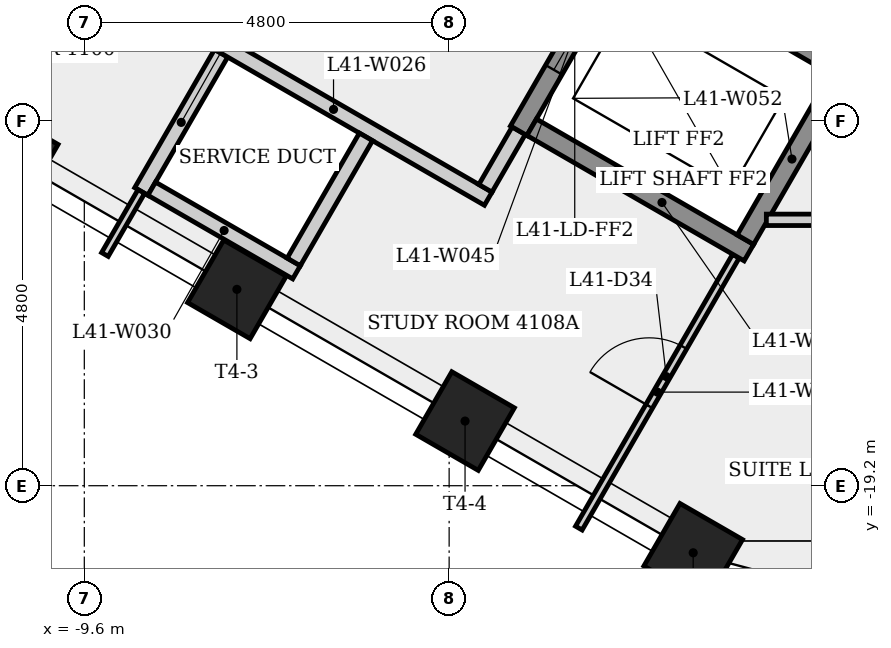
"""IFC4 building model, lengths in metres.
Left out: names, types, materials, properties, quantities, classifications, styles, units other than length and angle.
Written with IfcOpenShell. Run it as: python <this file> out.ifc"""

import sys

from ifc_helpers import new_model, si_unit, direction, frame, frame_2d, origin, origin_2d, place, context, subcontext, project, spatial, rectangle, extrude, element, fill, save


model = new_model("IFC4")
c1 = context("Model", 3, precision=1e-05, world=origin(), true_north=direction((0.0, 1.0)))
c2 = subcontext(c1, "Body", "Model", "MODEL_VIEW")
j1 = project(units=[si_unit("LENGTHUNIT", "METRE"), si_unit("PLANEANGLEUNIT", "RADIAN")], contexts=[c1])
p1 = place(None, origin())
s1 = spatial("IfcSite", under=j1, at=p1, CompositionType="ELEMENT")
p2 = place(p1, origin())
s2 = spatial("IfcBuilding", under=s1, at=p2, CompositionType="ELEMENT")
p3 = place(p2, frame((0.0, 0.0, 156.1)))
s3 = spatial("IfcBuildingStorey", under=s2, at=p3, CompositionType="ELEMENT", Elevation=156.1)
for number, where, z_axis, x_axis in (
    (1, (-10.594, -14.884, 0.0), (0.0, 0.0, 1.0), (-0.5, -0.866, 0.0)),
    (2, (-7.593, -16.616, 0.0), (0.0, 0.0, 1.0), (-0.5, -0.866, 0.0)),
    (3, (-4.591, -18.35, 0.0), (0.0, 0.0, 1.0), (-0.5, -0.866, 0.0)),
    (4, (-1.589, -20.083, 0.0), (0.0, 0.0, 1.0), (-0.5, -0.866, 0.0)),
):
    element("IfcColumn", number, at=place(p3, frame(where, z_axis=z_axis, x_axis=x_axis)), inside=s3, PredefinedType="COLUMN", context=c2, shape_type="SweptSolid", body=[
        extrude(rectangle(XDim=0.95, YDim=0.95, at=origin_2d()), origin(), (0.0, 0.0, 1.0), 3.4),
    ])
p4 = place(p3, frame((-8.85, -15.329, 0.0), z_axis=(0.0, 0.0, 1.0), x_axis=(0.500027713859, 0.866009402589, 0.0)))
e5 = element("IfcWall", 5, at=p4, inside=s3, PredefinedType="PLUMBINGWALL", context=c2, shape_type="SweptSolid", body=[
    extrude(rectangle(XDim=2.1, YDim=0.2, at=frame_2d((1.05, 0.0))), origin(), (0.0, 0.0, 1.0), 3.05),
])
p5 = place(p3, frame((-9.329, -16.158, 0.0), z_axis=(0.0, 0.0, 1.0), x_axis=(0.499950501706, 0.866053979752, 0.0)))
e6 = element("IfcWall", 6, at=p5, inside=s3, PredefinedType="PARTITIONING", context=c2, shape_type="SweptSolid", body=[
    extrude(rectangle(XDim=0.958, YDim=0.1, at=frame_2d((0.479, 0.0))), origin(), (0.0, 0.0, 1.0), 3.05),
])
p6 = place(p3, frame((-8.356, -13.073, 0.0), z_axis=(0.0, 0.0, 1.0), x_axis=(0.866038532462, -0.499977259774, 0.0)))
e7 = element("IfcWall", 7, at=p6, inside=s3, PredefinedType="PARTITIONING", context=c2, shape_type="SweptSolid", body=[
    extrude(rectangle(XDim=4.7, YDim=0.2, at=frame_2d((2.35, 0.0))), origin(), (0.0, 0.0, 1.0), 3.05),
])
p7 = place(p3, frame((-6.808, -16.392, 0.0), z_axis=(0.0, 0.0, 1.0), x_axis=(-0.866008176907, 0.50002983664, 0.0)))
e8 = element("IfcWall", 8, at=p7, inside=s3, PredefinedType="PLUMBINGWALL", context=c2, shape_type="SweptSolid", body=[
    extrude(rectangle(XDim=2.2, YDim=0.2, at=frame_2d((1.1, 0.0))), origin(), (0.0, 0.0, 1.0), 3.05),
])
p8 = place(p3, frame((-5.895, -14.61, 0.0), z_axis=(0.0, 0.0, 1.0), x_axis=(-0.500022797313, -0.86601224135, 0.0)))
e9 = element("IfcWall", 9, at=p8, inside=s3, PredefinedType="PLUMBINGWALL", context=c2, shape_type="SweptSolid", body=[
    extrude(rectangle(XDim=1.9, YDim=0.2, at=frame_2d((0.95, 0.0))), origin(), (0.0, 0.0, 1.0), 3.05),
])
p9 = place(p3, frame((-3.885, -14.529, 0.0), z_axis=(0.0, 0.0, 1.0), x_axis=(-0.499859285417, -0.866106630146, 0.0)))
e10 = element("IfcWall", 10, at=p9, inside=s3, PredefinedType="PARTITIONING", context=c2, shape_type="SweptSolid", body=[
    extrude(rectangle(XDim=0.875, YDim=0.2, at=frame_2d((0.438, 0.0))), origin(), (0.0, 0.0, 1.0), 3.05),
])
p10 = place(p3, frame((-3.094, -19.758, 0.0), z_axis=(0.0, 0.0, 1.0), x_axis=(0.500027577057, 0.866009481578, 0.0)))
e11 = element("IfcWall", 11, at=p10, inside=s3, PredefinedType="PARTITIONING", context=c2, shape_type="SweptSolid", body=[
    extrude(rectangle(XDim=4.133, YDim=0.1, at=frame_2d((2.066, 0.0))), origin(), (0.0, 0.0, 1.0), 3.05),
])
p11 = place(p10, frame((1.852, 0.0, 0.0)))
e12 = element("IfcOpeningElement", 12, at=p11, cuts=e11, PredefinedType="OPENING", context=c2, shape_type="SweptSolid", body=[
    extrude(rectangle(XDim=0.9, YDim=2.1, at=frame_2d((0.45, 1.05))), frame((0.0, 0.06, 0.0), z_axis=(0.0, -1.0, 0.0), x_axis=(1.0, 0.0, 0.0)), (0.0, 0.0, 1.0), 0.12),
])
p12 = place(p3, frame((-2.41, -11.974, 0.0), z_axis=(0.0, 0.0, 1.0), x_axis=(-0.500001826776, -0.866024349092, 0.0)))
e13 = element("IfcWall", 13, at=p12, inside=s3, PredefinedType="SHEAR", context=c2, shape_type="SweptSolid", body=[
    extrude(rectangle(XDim=2.95, YDim=0.25, at=frame_2d((1.475, 0.0))), origin(), (0.0, 0.0, 1.0), 3.05),
])
p13 = place(p12, frame((0.925, 0.0, 0.0)))
e14 = element("IfcOpeningElement", 14, at=p13, cuts=e13, PredefinedType="OPENING", context=c2, shape_type="SweptSolid", body=[
    extrude(rectangle(XDim=1.1, YDim=2.1, at=frame_2d((0.55, 1.05))), frame((0.0, 0.135, 0.0), z_axis=(0.0, -1.0, 0.0), x_axis=(1.0, 0.0, 0.0)), (0.0, 0.0, 1.0), 0.27),
])
p14 = place(p3, frame((-2.364, -12.145, 0.0), z_axis=(0.0, 0.0, 1.0), x_axis=(0.866040211805, -0.499974350878, 0.0)))
e15 = element("IfcWall", 15, at=p14, inside=s3, PredefinedType="SHEAR", context=c2, shape_type="SweptSolid", body=[
    extrude(rectangle(XDim=3.3, YDim=0.25, at=frame_2d((1.65, 0.0))), origin(), (0.0, 0.0, 1.0), 3.05),
])
p15 = place(p3, frame((-0.856, -16.133, 0.0), z_axis=(0.0, 0.0, 1.0), x_axis=(-0.866021716278, 0.500006386895, 0.0)))
e16 = element("IfcWall", 16, at=p15, inside=s3, PredefinedType="SHEAR", context=c2, shape_type="SweptSolid", body=[
    extrude(rectangle(XDim=3.3, YDim=0.25, at=frame_2d((1.65, 0.0))), origin(), (0.0, 0.0, 1.0), 3.05),
])
p16 = place(p3, frame((-0.902, -15.962, 0.0), z_axis=(0.0, 0.0, 1.0), x_axis=(0.500061746146, 0.865989751695, 0.0)))
e17 = element("IfcWall", 17, at=p16, inside=s3, PredefinedType="SHEAR", context=c2, shape_type="SweptSolid", body=[
    extrude(rectangle(XDim=2.45, YDim=0.25, at=frame_2d((1.225, 0.0))), origin(), (0.0, 0.0, 1.0), 3.4),
])
p17 = place(p3, frame((3.448, -15.702, 0.0), z_axis=(0.0, 0.0, 1.0), x_axis=(-1.0, 0.0, 0.0)))
e18 = element("IfcWall", 18, at=p17, inside=s3, PredefinedType="PARTITIONING", context=c2, shape_type="SweptSolid", body=[
    extrude(rectangle(XDim=4.074, YDim=0.15, at=frame_2d((2.037, 0.0))), origin(), (0.0, 0.0, 1.0), 3.05),
])
p18 = place(p17, frame((1.537, 0.0, 0.0)))
e19 = element("IfcOpeningElement", 19, at=p18, cuts=e18, PredefinedType="OPENING", context=c2, shape_type="SweptSolid", body=[
    extrude(rectangle(XDim=1.0, YDim=2.1, at=frame_2d((0.5, 1.05))), frame((0.0, 0.085, 0.0), z_axis=(0.0, -1.0, 0.0), x_axis=(1.0, 0.0, 0.0)), (0.0, 0.0, 1.0), 0.17),
])
p19 = place(p13, origin())
e20 = element("IfcDoor", 20, at=p19, inside=s3, OperationType="SLIDING_TO_LEFT", PredefinedType="DOOR", context=c2, shape_type="SweptSolid", body=[
    extrude(rectangle(XDim=1.1, YDim=2.1, at=frame_2d((0.55, 1.05))), frame((0.0, 0.025, 0.0), z_axis=(0.0, -1.0, 0.0), x_axis=(1.0, 0.0, 0.0)), (0.0, 0.0, 1.0), 0.05),
])
fill(e14, e20)
p20 = place(p11, origin())
e21 = element("IfcDoor", 21, at=p20, inside=s3, OperationType="SINGLE_SWING_LEFT", PredefinedType="DOOR", context=c2, shape_type="SweptSolid", body=[
    extrude(rectangle(XDim=0.9, YDim=2.1, at=frame_2d((0.45, 1.05))), frame((0.0, 0.025, 0.0), z_axis=(0.0, -1.0, 0.0), x_axis=(1.0, 0.0, 0.0)), (0.0, 0.0, 1.0), 0.05),
])
fill(e12, e21)
save(model, sys.argv[1])
